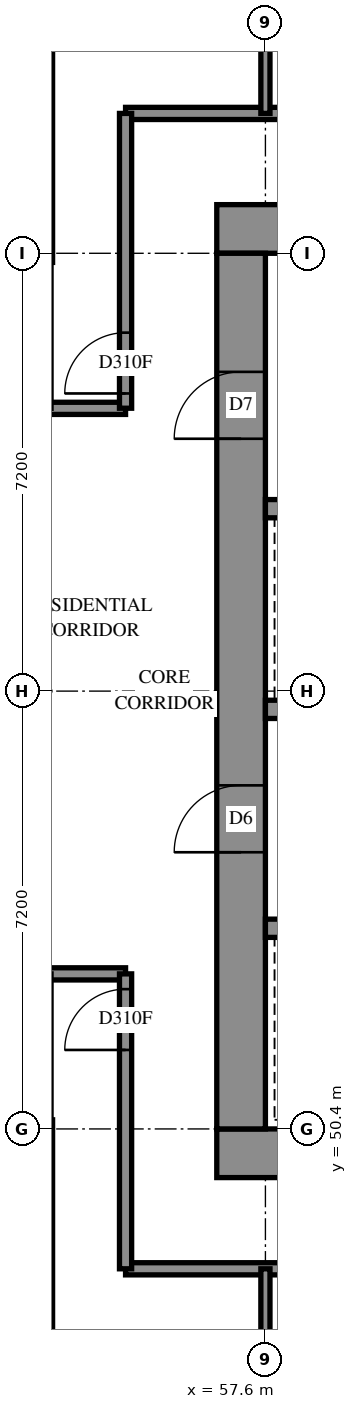
"""IFC4 building model, lengths in metres.
Left out: names, types, materials, properties, quantities, classifications, styles, units other than length and angle.
Written with IfcOpenShell. Run it as: python <this file> out.ifc"""

import sys

from ifc_helpers import new_model, si_unit, direction, frame, frame_2d, origin, place, context, subcontext, project, spatial, rectangle, extrude, element, fill, save


model = new_model("IFC4")
c1 = context("Model", 3, precision=1e-05, world=origin(), true_north=direction((0.0, 1.0)))
c2 = subcontext(c1, "Body", "Model", "MODEL_VIEW")
j1 = project(units=[si_unit("LENGTHUNIT", "METRE"), si_unit("PLANEANGLEUNIT", "RADIAN")], contexts=[c1])
p1 = place(None, origin())
s1 = spatial("IfcSite", under=j1, at=p1, CompositionType="ELEMENT")
p2 = place(p1, origin())
s2 = spatial("IfcBuilding", under=s1, at=p2, CompositionType="ELEMENT")
p3 = place(p2, frame((0.0, 0.0, 88.0)))
s3 = spatial("IfcBuildingStorey", under=s2, at=p3, CompositionType="ELEMENT", Elevation=88.0)
p4 = place(p3, frame((56.8, 50.0, -0.3), z_axis=(0.0, 0.0, 1.0), x_axis=(1.0, 0.0, 0.0)))
e1 = element("IfcWall", 1, at=p4, inside=s3, PredefinedType="SHEAR", context=c2, shape_type="SweptSolid", body=[
    extrude(rectangle(XDim=16.0, YDim=0.8, at=frame_2d((8.0, 0.0))), origin(), (0.0, 0.0, 1.0), 2.7),
])
p5 = place(p3, frame((56.8, 65.2, -0.3), z_axis=(0.0, 0.0, 1.0), x_axis=(1.0, 0.0, 0.0)))
e2 = element("IfcWall", 2, at=p5, inside=s3, PredefinedType="SHEAR", context=c2, shape_type="SweptSolid", body=[
    extrude(rectangle(XDim=16.0, YDim=0.8, at=frame_2d((8.0, 0.0))), origin(), (0.0, 0.0, 1.0), 2.7),
])
p6 = place(p5, frame((10.8, 0.0, 0.3)))
e3 = element("IfcOpeningElement", 3, at=p6, cuts=e2, PredefinedType="OPENING", context=c2, shape_type="SweptSolid", body=[
    extrude(rectangle(XDim=0.8, YDim=2.1, at=frame_2d((0.4, 1.05))), frame((0.0, 0.41, 0.0), z_axis=(0.0, -1.0, 0.0), x_axis=(1.0, 0.0, 0.0)), (0.0, 0.0, 1.0), 0.82),
])
p7 = place(p3, frame((57.2, 50.4, -0.3), z_axis=(0.0, 0.0, 1.0), x_axis=(0.0, 1.0, 0.0)))
e4 = element("IfcWall", 4, at=p7, inside=s3, PredefinedType="SHEAR", context=c2, shape_type="SweptSolid", body=[
    extrude(rectangle(XDim=14.4, YDim=0.8, at=frame_2d((7.2, 0.0))), origin(), (0.0, 0.0, 1.0), 2.7),
])
p8 = place(p7, frame((4.55, 0.0, 0.3)))
e5 = element("IfcOpeningElement", 5, at=p8, cuts=e4, PredefinedType="OPENING", context=c2, shape_type="SweptSolid", body=[
    extrude(rectangle(XDim=1.1, YDim=2.1, at=frame_2d((0.55, 1.05))), frame((0.0, 0.41, 0.0), z_axis=(0.0, -1.0, 0.0), x_axis=(1.0, 0.0, 0.0)), (0.0, 0.0, 1.0), 0.82),
])
p9 = place(p7, frame((11.35, 0.0, 0.3)))
e6 = element("IfcOpeningElement", 6, at=p9, cuts=e4, PredefinedType="OPENING", context=c2, shape_type="SweptSolid", body=[
    extrude(rectangle(XDim=1.1, YDim=2.1, at=frame_2d((0.55, 1.05))), frame((0.0, 0.41, 0.0), z_axis=(0.0, -1.0, 0.0), x_axis=(1.0, 0.0, 0.0)), (0.0, 0.0, 1.0), 0.82),
])
p10 = place(p3, frame((57.6, 53.7, 0.0), z_axis=(0.0, 0.0, 1.0), x_axis=(1.0, 0.0, 0.0)))
e7 = element("IfcWall", 7, at=p10, inside=s3, PredefinedType="SOLIDWALL", context=c2, shape_type="SweptSolid", body=[
    extrude(rectangle(XDim=14.4, YDim=0.3, at=frame_2d((7.2, 0.0))), origin(), (0.0, 0.0, 1.0), 3.1),
])
p11 = place(p10, frame((1.25, 0.0, 0.0)))
e8 = element("IfcOpeningElement", 8, at=p11, cuts=e7, PredefinedType="OPENING", context=c2, shape_type="SweptSolid", body=[
    extrude(rectangle(XDim=1.1, YDim=2.1, at=frame_2d((0.55, 1.05))), frame((0.0, 0.16, 0.0), z_axis=(0.0, -1.0, 0.0), x_axis=(1.0, 0.0, 0.0)), (0.0, 0.0, 1.0), 0.32),
])
p12 = place(p10, frame((4.85, 0.0, 0.0)))
e9 = element("IfcOpeningElement", 9, at=p12, cuts=e7, PredefinedType="OPENING", context=c2, shape_type="SweptSolid", body=[
    extrude(rectangle(XDim=1.1, YDim=2.1, at=frame_2d((0.55, 1.05))), frame((0.0, 0.16, 0.0), z_axis=(0.0, -1.0, 0.0), x_axis=(1.0, 0.0, 0.0)), (0.0, 0.0, 1.0), 0.32),
])
p13 = place(p10, frame((8.45, 0.0, 0.0)))
e10 = element("IfcOpeningElement", 10, at=p13, cuts=e7, PredefinedType="OPENING", context=c2, shape_type="SweptSolid", body=[
    extrude(rectangle(XDim=1.1, YDim=2.1, at=frame_2d((0.55, 1.05))), frame((0.0, 0.16, 0.0), z_axis=(0.0, -1.0, 0.0), x_axis=(1.0, 0.0, 0.0)), (0.0, 0.0, 1.0), 0.32),
])
p14 = place(p10, frame((12.05, 0.0, 0.0)))
e11 = element("IfcOpeningElement", 11, at=p14, cuts=e7, PredefinedType="OPENING", context=c2, shape_type="SweptSolid", body=[
    extrude(rectangle(XDim=1.1, YDim=2.1, at=frame_2d((0.55, 1.05))), frame((0.0, 0.16, 0.0), z_axis=(0.0, -1.0, 0.0), x_axis=(1.0, 0.0, 0.0)), (0.0, 0.0, 1.0), 0.32),
])
p15 = place(p3, frame((57.6, 57.3, 0.0), z_axis=(0.0, 0.0, 1.0), x_axis=(1.0, 0.0, 0.0)))
e12 = element("IfcWall", 12, at=p15, inside=s3, PredefinedType="SOLIDWALL", context=c2, shape_type="SweptSolid", body=[
    extrude(rectangle(XDim=14.4, YDim=0.3, at=frame_2d((7.2, 0.0))), origin(), (0.0, 0.0, 1.0), 3.1),
])
p16 = place(p15, frame((12.05, 0.0, 0.0)))
e13 = element("IfcOpeningElement", 13, at=p16, cuts=e12, PredefinedType="OPENING", context=c2, shape_type="SweptSolid", body=[
    extrude(rectangle(XDim=1.1, YDim=2.1, at=frame_2d((0.55, 1.05))), frame((0.0, 0.16, 0.0), z_axis=(0.0, -1.0, 0.0), x_axis=(1.0, 0.0, 0.0)), (0.0, 0.0, 1.0), 0.32),
])
p17 = place(p3, frame((57.6, 60.6, 0.0), z_axis=(0.0, 0.0, 1.0), x_axis=(1.0, 0.0, 0.0)))
e14 = element("IfcWall", 14, at=p17, inside=s3, PredefinedType="SOLIDWALL", context=c2, shape_type="SweptSolid", body=[
    extrude(rectangle(XDim=7.2, YDim=0.3, at=frame_2d((3.6, 0.0))), origin(), (0.0, 0.0, 1.0), 3.1),
])
p18 = place(p3, frame((33.45, 62.25, 0.0), z_axis=(0.0, 0.0, 1.0), x_axis=(1.0, 0.0, 0.0)))
e15 = element("IfcWall", 15, at=p18, inside=s3, PredefinedType="PARTITIONING", context=c2, shape_type="SweptSolid", body=[
    extrude(rectangle(XDim=21.85, YDim=0.2, at=frame_2d((10.925, 0.0))), origin(), (0.0, 0.0, 1.0), 3.1),
])
p19 = place(p18, frame((0.144, 0.0, 0.0)))
e16 = element("IfcOpeningElement", 16, at=p19, cuts=e15, PredefinedType="OPENING", context=c2, shape_type="SweptSolid", body=[
    extrude(rectangle(XDim=1.0, YDim=2.1, at=frame_2d((0.5, 1.05))), frame((0.0, 0.11, 0.0), z_axis=(0.0, -1.0, 0.0), x_axis=(1.0, 0.0, 0.0)), (0.0, 0.0, 1.0), 0.22),
])
p20 = place(p18, frame((2.95, 0.0, 0.0)))
e17 = element("IfcOpeningElement", 17, at=p20, cuts=e15, PredefinedType="OPENING", context=c2, shape_type="SweptSolid", body=[
    extrude(rectangle(XDim=0.9, YDim=2.1, at=frame_2d((0.45, 1.05))), frame((0.0, 0.11, 0.0), z_axis=(0.0, -1.0, 0.0), x_axis=(1.0, 0.0, 0.0)), (0.0, 0.0, 1.0), 0.22),
])
p21 = place(p18, frame((8.407, 0.0, 0.0)))
e18 = element("IfcOpeningElement", 18, at=p21, cuts=e15, PredefinedType="OPENING", context=c2, shape_type="SweptSolid", body=[
    extrude(rectangle(XDim=0.9, YDim=2.1, at=frame_2d((0.45, 1.05))), frame((0.0, 0.11, 0.0), z_axis=(0.0, -1.0, 0.0), x_axis=(1.0, 0.0, 0.0)), (0.0, 0.0, 1.0), 0.22),
])
p22 = place(p18, frame((15.7, 0.0, 0.0)))
e19 = element("IfcOpeningElement", 19, at=p22, cuts=e15, PredefinedType="OPENING", context=c2, shape_type="SweptSolid", body=[
    extrude(rectangle(XDim=0.9, YDim=2.1, at=frame_2d((0.45, 1.05))), frame((0.0, 0.11, 0.0), z_axis=(0.0, -1.0, 0.0), x_axis=(1.0, 0.0, 0.0)), (0.0, 0.0, 1.0), 0.22),
])
p23 = place(p18, frame((17.35, 0.0, 0.0)))
e20 = element("IfcOpeningElement", 20, at=p23, cuts=e15, PredefinedType="OPENING", context=c2, shape_type="SweptSolid", body=[
    extrude(rectangle(XDim=0.9, YDim=2.1, at=frame_2d((0.45, 1.05))), frame((0.0, 0.11, 0.0), z_axis=(0.0, -1.0, 0.0), x_axis=(1.0, 0.0, 0.0)), (0.0, 0.0, 1.0), 0.22),
])
p24 = place(p3, frame((55.3, 48.1, 0.0), z_axis=(0.0, 0.0, 1.0), x_axis=(1.0, 0.0, 0.0)))
e21 = element("IfcWall", 21, at=p24, inside=s3, PredefinedType="PARTITIONING", context=c2, shape_type="SweptSolid", body=[
    extrude(rectangle(XDim=19.092, YDim=0.2, at=frame_2d((9.546, 0.0))), origin(), (0.0, 0.0, 1.0), 3.1),
])
p25 = place(p24, frame((6.199, 0.0, 0.0)))
e22 = element("IfcOpeningElement", 22, at=p25, cuts=e21, PredefinedType="OPENING", context=c2, shape_type="SweptSolid", body=[
    extrude(rectangle(XDim=0.9, YDim=2.1, at=frame_2d((0.45, 1.05))), frame((0.0, 0.11, 0.0), z_axis=(0.0, -1.0, 0.0), x_axis=(1.0, 0.0, 0.0)), (0.0, 0.0, 1.0), 0.22),
])
p26 = place(p24, frame((13.363, 0.0, 0.0)))
e23 = element("IfcOpeningElement", 23, at=p26, cuts=e21, PredefinedType="OPENING", context=c2, shape_type="SweptSolid", body=[
    extrude(rectangle(XDim=1.0, YDim=2.1, at=frame_2d((0.5, 1.05))), frame((0.0, 0.11, 0.0), z_axis=(0.0, -1.0, 0.0), x_axis=(1.0, 0.0, 0.0)), (0.0, 0.0, 1.0), 0.22),
])
p27 = place(p3, frame((55.3, 67.1, 0.0), z_axis=(0.0, 0.0, 1.0), x_axis=(1.0, 0.0, 0.0)))
e24 = element("IfcWall", 24, at=p27, inside=s3, PredefinedType="PARTITIONING", context=c2, shape_type="SweptSolid", body=[
    extrude(rectangle(XDim=19.0, YDim=0.2, at=frame_2d((9.5, 0.0))), origin(), (0.0, 0.0, 1.0), 3.1),
])
p28 = place(p27, frame((6.161, 0.0, 0.0)))
e25 = element("IfcOpeningElement", 25, at=p28, cuts=e24, PredefinedType="OPENING", context=c2, shape_type="SweptSolid", body=[
    extrude(rectangle(XDim=0.9, YDim=2.1, at=frame_2d((0.45, 1.05))), frame((0.0, 0.11, 0.0), z_axis=(0.0, -1.0, 0.0), x_axis=(1.0, 0.0, 0.0)), (0.0, 0.0, 1.0), 0.22),
])
p29 = place(p27, frame((13.386, 0.0, 0.0)))
e26 = element("IfcOpeningElement", 26, at=p29, cuts=e24, PredefinedType="OPENING", context=c2, shape_type="SweptSolid", body=[
    extrude(rectangle(XDim=1.0, YDim=2.1, at=frame_2d((0.5, 1.05))), frame((0.0, 0.11, 0.0), z_axis=(0.0, -1.0, 0.0), x_axis=(1.0, 0.0, 0.0)), (0.0, 0.0, 1.0), 0.22),
])
p30 = place(p3, frame((50.4, 52.95, 0.0), z_axis=(0.0, 0.0, 1.0), x_axis=(1.0, 0.0, 0.0)))
e27 = element("IfcWall", 27, at=p30, inside=s3, PredefinedType="PARTITIONING", context=c2, shape_type="SweptSolid", body=[
    extrude(rectangle(XDim=4.9, YDim=0.2, at=frame_2d((2.45, 0.0))), origin(), (0.0, 0.0, 1.0), 3.1),
])
p31 = place(p30, frame((0.4, 0.0, 0.0)))
e28 = element("IfcOpeningElement", 28, at=p31, cuts=e27, PredefinedType="OPENING", context=c2, shape_type="SweptSolid", body=[
    extrude(rectangle(XDim=0.9, YDim=2.1, at=frame_2d((0.45, 1.05))), frame((0.0, 0.11, 0.0), z_axis=(0.0, -1.0, 0.0), x_axis=(1.0, 0.0, 0.0)), (0.0, 0.0, 1.0), 0.22),
])
p32 = place(p3, frame((55.3, 48.1, 0.0), z_axis=(0.0, 0.0, 1.0), x_axis=(0.0, 1.0, 0.0)))
e29 = element("IfcWall", 29, at=p32, inside=s3, PredefinedType="PARTITIONING", context=c2, shape_type="SweptSolid", body=[
    extrude(rectangle(XDim=4.85, YDim=0.2, at=frame_2d((2.425, 0.0))), origin(), (0.0, 0.0, 1.0), 3.1),
])
p33 = place(p32, frame((3.599, 0.0, 0.0)))
e30 = element("IfcOpeningElement", 30, at=p33, cuts=e29, PredefinedType="OPENING", context=c2, shape_type="SweptSolid", body=[
    extrude(rectangle(XDim=1.0, YDim=2.1, at=frame_2d((0.5, 1.05))), frame((0.0, 0.11, 0.0), z_axis=(0.0, -1.0, 0.0), x_axis=(1.0, 0.0, 0.0)), (0.0, 0.0, 1.0), 0.22),
])
p34 = place(p3, frame((55.3, 62.252, 0.0), z_axis=(0.0, 0.0, 1.0), x_axis=(0.0, 1.0, 0.0)))
e31 = element("IfcWall", 31, at=p34, inside=s3, PredefinedType="PARTITIONING", context=c2, shape_type="SweptSolid", body=[
    extrude(rectangle(XDim=4.848, YDim=0.2, at=frame_2d((2.424, 0.0))), origin(), (0.0, 0.0, 1.0), 3.1),
])
p35 = place(p34, frame((0.243, 0.0, 0.0)))
e32 = element("IfcOpeningElement", 32, at=p35, cuts=e31, PredefinedType="OPENING", context=c2, shape_type="SweptSolid", body=[
    extrude(rectangle(XDim=1.0, YDim=2.1, at=frame_2d((0.5, 1.05))), frame((0.0, 0.11, 0.0), z_axis=(0.0, -1.0, 0.0), x_axis=(1.0, 0.0, 0.0)), (0.0, 0.0, 1.0), 0.22),
])
for number, where, z_axis, x_axis in (
    (33, (57.6, 67.1, 0.0), (0.0, 0.0, 1.0), (0.0, 1.0, 0.0)),
    (34, (57.6, 45.7, 0.0), (0.0, 0.0, 1.0), (0.0, 1.0, 0.0)),
):
    element("IfcWall", number, at=place(p3, frame(where, z_axis=z_axis, x_axis=x_axis)), inside=s3, PredefinedType="PARTITIONING", context=c2, shape_type="SweptSolid", body=[
        extrude(rectangle(XDim=2.4, YDim=0.15, at=frame_2d((1.2, 0.0))), origin(), (0.0, 0.0, 1.0), 3.1),
    ])
p36 = place(p8, origin())
e35 = element("IfcDoor", 35, at=p36, inside=s3, OperationType="DOUBLE_DOOR_SINGLE_SWING", PredefinedType="DOOR", context=c2, shape_type="SweptSolid", body=[
    extrude(rectangle(XDim=1.1, YDim=2.1, at=frame_2d((0.55, 1.05))), frame((0.0, 0.025, 0.0), z_axis=(0.0, -1.0, 0.0), x_axis=(1.0, 0.0, 0.0)), (0.0, 0.0, 1.0), 0.05),
])
fill(e5, e35)
p37 = place(p9, origin())
e36 = element("IfcDoor", 36, at=p37, inside=s3, OperationType="SINGLE_SWING_LEFT", PredefinedType="DOOR", context=c2, shape_type="SweptSolid", body=[
    extrude(rectangle(XDim=1.1, YDim=2.1, at=frame_2d((0.55, 1.05))), frame((0.0, 0.025, 0.0), z_axis=(0.0, -1.0, 0.0), x_axis=(1.0, 0.0, 0.0)), (0.0, 0.0, 1.0), 0.05),
])
fill(e6, e36)
p38 = place(p35, origin())
e37 = element("IfcDoor", 37, at=p38, inside=s3, OperationType="SINGLE_SWING_LEFT", PredefinedType="DOOR", context=c2, shape_type="SweptSolid", body=[
    extrude(rectangle(XDim=1.0, YDim=2.1, at=frame_2d((0.5, 1.05))), frame((0.0, 0.025, 0.0), z_axis=(0.0, -1.0, 0.0), x_axis=(1.0, 0.0, 0.0)), (0.0, 0.0, 1.0), 0.05),
])
fill(e32, e37)
p39 = place(p33, origin())
e38 = element("IfcDoor", 38, at=p39, inside=s3, OperationType="SINGLE_SWING_RIGHT", PredefinedType="DOOR", context=c2, shape_type="SweptSolid", body=[
    extrude(rectangle(XDim=1.0, YDim=2.1, at=frame_2d((0.5, 1.05))), frame((0.0, 0.025, 0.0), z_axis=(0.0, -1.0, 0.0), x_axis=(1.0, 0.0, 0.0)), (0.0, 0.0, 1.0), 0.05),
])
fill(e30, e38)
save(model, sys.argv[1])
